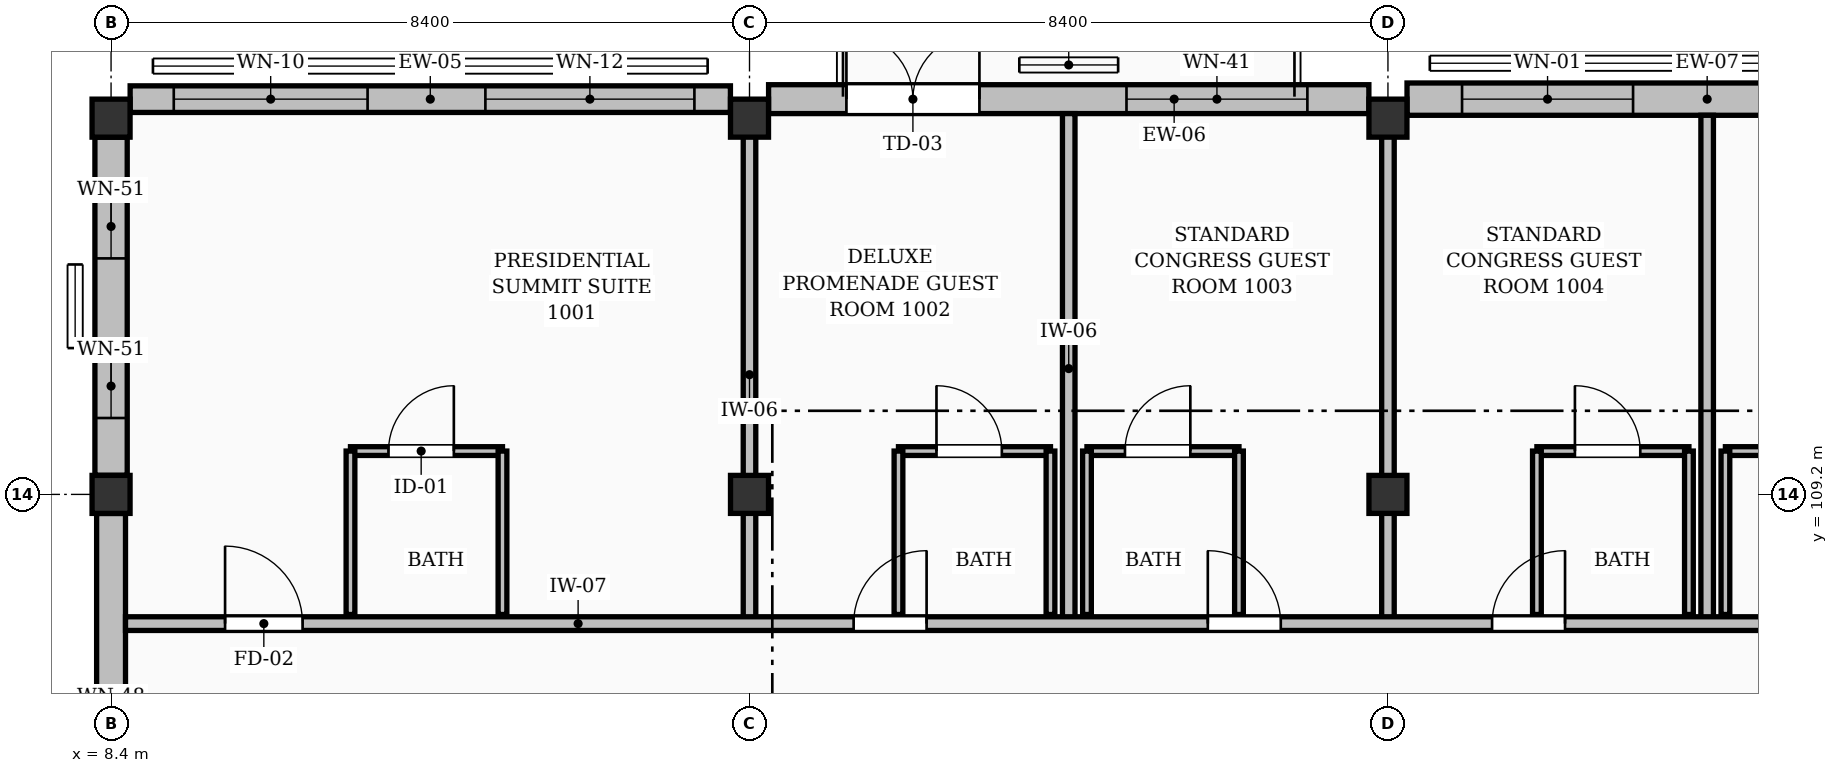
"""IFC4 building model, lengths in metres.
Left out: names, types, materials, properties, quantities, classifications, styles, units other than length and angle.
Written with IfcOpenShell. Run it as: python <this file> out.ifc"""

import sys

from ifc_helpers import new_model, si_unit, direction, frame, frame_2d, origin, origin_2d, place, context, subcontext, project, spatial, rectangle, extrude, element, fill, save


model = new_model("IFC4")
c1 = context("Model", 3, precision=1e-05, world=origin(), true_north=direction((0.0, 1.0)))
c2 = subcontext(c1, "Body", "Model", "MODEL_VIEW")
j1 = project(units=[si_unit("LENGTHUNIT", "METRE"), si_unit("PLANEANGLEUNIT", "RADIAN")], contexts=[c1])
p1 = place(None, origin())
s1 = spatial("IfcSite", under=j1, at=p1, CompositionType="ELEMENT")
p2 = place(p1, origin())
s2 = spatial("IfcBuilding", under=s1, at=p2, CompositionType="ELEMENT")
p3 = place(p2, frame((0.0, 0.0, 35.28)))
s3 = spatial("IfcBuildingStorey", under=s2, at=p3, CompositionType="ELEMENT", Elevation=35.28)
for number, where, z_axis, x_axis in (
    (1, (8.4, 109.2, 0.0), (0.0, 0.0, 1.0), (1.0, 0.0, 0.0)),
    (2, (8.4, 114.15, 0.0), (0.0, 0.0, 1.0), (1.0, 0.0, 0.0)),
    (3, (16.8, 109.2, 0.0), (0.0, 0.0, 1.0), (1.0, 0.0, 0.0)),
    (4, (16.8, 114.15, 0.0), (0.0, 0.0, 1.0), (1.0, 0.0, 0.0)),
    (5, (25.2, 109.2, 0.0), (0.0, 0.0, 1.0), (1.0, 0.0, 0.0)),
    (6, (25.2, 114.15, 0.0), (0.0, 0.0, 1.0), (1.0, 0.0, 0.0)),
):
    element("IfcColumn", number, at=place(p3, frame(where, z_axis=z_axis, x_axis=x_axis)), inside=s3, PredefinedType="COLUMN", context=c2, shape_type="SweptSolid", body=[
        extrude(rectangle(XDim=0.5, YDim=0.5, at=origin_2d()), origin(), (0.0, 0.0, 1.0), 3.36),
    ])
p4 = place(p3, frame((8.651, 114.4, 0.0), z_axis=(0.0, 0.0, 1.0), x_axis=(1.0, 0.0, 0.0)))
e7 = element("IfcWall", 7, at=p4, inside=s3, PredefinedType="SOLIDWALL", context=c2, shape_type="SweptSolid", body=[
    extrude(rectangle(XDim=7.898, YDim=0.35, at=frame_2d((3.949, 0.0))), origin(), (0.0, 0.0, 1.0), 2.514),
])
p5 = place(p4, frame((0.574, 0.0, 0.25)))
e8 = element("IfcOpeningElement", 8, at=p5, cuts=e7, PredefinedType="OPENING", context=c2, shape_type="SweptSolid", body=[
    extrude(rectangle(XDim=2.55, YDim=1.95, at=frame_2d((1.275, 0.975))), frame((0.0, 0.185, 0.0), z_axis=(0.0, -1.0, 0.0), x_axis=(1.0, 0.0, 0.0)), (0.0, 0.0, 1.0), 0.37),
])
p6 = place(p4, frame((4.674, 0.0, 0.25)))
e9 = element("IfcOpeningElement", 9, at=p6, cuts=e7, PredefinedType="OPENING", context=c2, shape_type="SweptSolid", body=[
    extrude(rectangle(XDim=2.75, YDim=1.95, at=frame_2d((1.375, 0.975))), frame((0.0, 0.185, 0.0), z_axis=(0.0, -1.0, 0.0), x_axis=(1.0, 0.0, 0.0)), (0.0, 0.0, 1.0), 0.37),
])
p7 = place(p3, frame((17.051, 114.4, 0.0), z_axis=(0.0, 0.0, 1.0), x_axis=(1.0, 0.0, 0.0)))
e10 = element("IfcWall", 10, at=p7, inside=s3, PredefinedType="SOLIDWALL", context=c2, shape_type="SweptSolid", body=[
    extrude(rectangle(XDim=7.898, YDim=0.38, at=frame_2d((3.949, 0.0))), origin(), (0.0, 0.0, 1.0), 2.514),
])
p8 = place(p7, frame((1.024, 0.0, 0.0)))
e11 = element("IfcOpeningElement", 11, at=p8, cuts=e10, PredefinedType="OPENING", context=c2, shape_type="SweptSolid", body=[
    extrude(rectangle(XDim=1.75, YDim=2.08, at=frame_2d((0.875, 1.04))), frame((0.0, 0.2, 0.0), z_axis=(0.0, -1.0, 0.0), x_axis=(1.0, 0.0, 0.0)), (0.0, 0.0, 1.0), 0.4),
])
p9 = place(p7, frame((4.709, 0.0, 0.25)))
e12 = element("IfcOpeningElement", 12, at=p9, cuts=e10, PredefinedType="OPENING", context=c2, shape_type="SweptSolid", body=[
    extrude(rectangle(XDim=2.38, YDim=2.0, at=frame_2d((1.19, 1.0))), frame((0.0, 0.2, 0.0), z_axis=(0.0, -1.0, 0.0), x_axis=(1.0, 0.0, 0.0)), (0.0, 0.0, 1.0), 0.4),
])
p10 = place(p3, frame((25.451, 114.4, 0.0), z_axis=(0.0, 0.0, 1.0), x_axis=(1.0, 0.0, 0.0)))
e13 = element("IfcWall", 13, at=p10, inside=s3, PredefinedType="SOLIDWALL", context=c2, shape_type="SweptSolid", body=[
    extrude(rectangle(XDim=7.898, YDim=0.425, at=frame_2d((3.949, 0.0))), origin(), (0.0, 0.0, 1.0), 2.514),
])
p11 = place(p10, frame((0.724, 0.0, 0.25)))
e14 = element("IfcOpeningElement", 14, at=p11, cuts=e13, PredefinedType="OPENING", context=c2, shape_type="SweptSolid", body=[
    extrude(rectangle(XDim=2.25, YDim=1.85, at=frame_2d((1.125, 0.925))), frame((0.0, 0.223, 0.0), z_axis=(0.0, -1.0, 0.0), x_axis=(1.0, 0.0, 0.0)), (0.0, 0.0, 1.0), 0.445),
])
p12 = place(p10, frame((4.924, 0.0, 0.25)))
e15 = element("IfcOpeningElement", 15, at=p12, cuts=e13, PredefinedType="OPENING", context=c2, shape_type="SweptSolid", body=[
    extrude(rectangle(XDim=2.25, YDim=1.95, at=frame_2d((1.125, 0.975))), frame((0.0, 0.223, 0.0), z_axis=(0.0, -1.0, 0.0), x_axis=(1.0, 0.0, 0.0)), (0.0, 0.0, 1.0), 0.445),
])
p13 = place(p3, frame((8.4, 101.051, 0.0), z_axis=(0.0, 0.0, 1.0), x_axis=(0.0, 1.0, 0.0)))
e16 = element("IfcWall", 16, at=p13, inside=s3, PredefinedType="SOLIDWALL", context=c2, shape_type="SweptSolid", body=[
    extrude(rectangle(XDim=7.898, YDim=0.38, at=frame_2d((3.949, 0.0))), origin(), (0.0, 0.0, 1.0), 2.514),
])
p14 = place(p13, frame((2.449, 0.0, 0.3)))
e17 = element("IfcOpeningElement", 17, at=p14, cuts=e16, PredefinedType="OPENING", context=c2, shape_type="SweptSolid", body=[
    extrude(rectangle(XDim=0.9, YDim=1.85, at=frame_2d((0.45, 0.925))), frame((0.0, 0.2, 0.0), z_axis=(0.0, -1.0, 0.0), x_axis=(1.0, 0.0, 0.0)), (0.0, 0.0, 1.0), 0.4),
])
p15 = place(p13, frame((4.549, 0.0, 0.3)))
e18 = element("IfcOpeningElement", 18, at=p15, cuts=e16, PredefinedType="OPENING", context=c2, shape_type="SweptSolid", body=[
    extrude(rectangle(XDim=0.9, YDim=1.85, at=frame_2d((0.45, 0.925))), frame((0.0, 0.2, 0.0), z_axis=(0.0, -1.0, 0.0), x_axis=(1.0, 0.0, 0.0)), (0.0, 0.0, 1.0), 0.4),
])
p16 = place(p3, frame((8.4, 109.451, 0.0), z_axis=(0.0, 0.0, 1.0), x_axis=(0.0, 1.0, 0.0)))
e19 = element("IfcWall", 19, at=p16, inside=s3, PredefinedType="SOLIDWALL", context=c2, shape_type="SweptSolid", body=[
    extrude(rectangle(XDim=4.448, YDim=0.425, at=frame_2d((2.224, 0.0))), origin(), (0.0, 0.0, 1.0), 2.514),
])
p17 = place(p16, frame((0.754, 0.0, 0.3)))
e20 = element("IfcOpeningElement", 20, at=p17, cuts=e19, PredefinedType="OPENING", context=c2, shape_type="SweptSolid", body=[
    extrude(rectangle(XDim=0.84, YDim=1.95, at=frame_2d((0.42, 0.975))), frame((0.0, 0.223, 0.0), z_axis=(0.0, -1.0, 0.0), x_axis=(1.0, 0.0, 0.0)), (0.0, 0.0, 1.0), 0.445),
])
p18 = place(p16, frame((2.854, 0.0, 0.3)))
e21 = element("IfcOpeningElement", 21, at=p18, cuts=e19, PredefinedType="OPENING", context=c2, shape_type="SweptSolid", body=[
    extrude(rectangle(XDim=0.84, YDim=1.95, at=frame_2d((0.42, 0.975))), frame((0.0, 0.223, 0.0), z_axis=(0.0, -1.0, 0.0), x_axis=(1.0, 0.0, 0.0)), (0.0, 0.0, 1.0), 0.445),
])
p19 = place(p3, frame((11.55, 109.77, 0.0), z_axis=(0.0, 0.0, 1.0), x_axis=(1.0, 0.0, 0.0)))
e22 = element("IfcWall", 22, at=p19, inside=s3, PredefinedType="PARTITIONING", context=c2, shape_type="SweptSolid", body=[
    extrude(rectangle(XDim=2.0, YDim=0.115, at=frame_2d((1.0, 0.0))), origin(), (0.0, 0.0, 1.0), 3.14),
])
p20 = place(p19, frame((0.5, 0.0, 0.0)))
e23 = element("IfcOpeningElement", 23, at=p20, cuts=e22, PredefinedType="OPENING", context=c2, shape_type="SweptSolid", body=[
    extrude(rectangle(XDim=0.86, YDim=2.05, at=frame_2d((0.43, 1.025))), frame((0.0, 0.067, 0.0), z_axis=(0.0, -1.0, 0.0), x_axis=(1.0, 0.0, 0.0)), (0.0, 0.0, 1.0), 0.135),
])
for number, where, z_axis, x_axis in (
    (24, (11.55, 107.62, 0.0), (0.0, 0.0, 1.0), (0.0, 1.0, 0.0)),
    (25, (13.55, 107.62, 0.0), (0.0, 0.0, 1.0), (0.0, 1.0, 0.0)),
):
    element("IfcWall", number, at=place(p3, frame(where, z_axis=z_axis, x_axis=x_axis)), inside=s3, PredefinedType="PARTITIONING", context=c2, shape_type="SweptSolid", body=[
        extrude(rectangle(XDim=2.15, YDim=0.115, at=frame_2d((1.075, 0.0))), origin(), (0.0, 0.0, 1.0), 3.14),
    ])
p21 = place(p3, frame((18.76, 109.77, 0.0), z_axis=(0.0, 0.0, 1.0), x_axis=(1.0, 0.0, 0.0)))
e26 = element("IfcWall", 26, at=p21, inside=s3, PredefinedType="PARTITIONING", context=c2, shape_type="SweptSolid", body=[
    extrude(rectangle(XDim=2.0, YDim=0.115, at=frame_2d((1.0, 0.0))), origin(), (0.0, 0.0, 1.0), 3.14),
])
p22 = place(p21, frame((0.5, 0.0, 0.0)))
e27 = element("IfcOpeningElement", 27, at=p22, cuts=e26, PredefinedType="OPENING", context=c2, shape_type="SweptSolid", body=[
    extrude(rectangle(XDim=0.86, YDim=2.05, at=frame_2d((0.43, 1.025))), frame((0.0, 0.067, 0.0), z_axis=(0.0, -1.0, 0.0), x_axis=(1.0, 0.0, 0.0)), (0.0, 0.0, 1.0), 0.135),
])
for number, where, z_axis, x_axis in (
    (28, (18.76, 107.62, 0.0), (0.0, 0.0, 1.0), (0.0, 1.0, 0.0)),
    (29, (20.76, 107.62, 0.0), (0.0, 0.0, 1.0), (0.0, 1.0, 0.0)),
):
    element("IfcWall", number, at=place(p3, frame(where, z_axis=z_axis, x_axis=x_axis)), inside=s3, PredefinedType="PARTITIONING", context=c2, shape_type="SweptSolid", body=[
        extrude(rectangle(XDim=2.15, YDim=0.115, at=frame_2d((1.075, 0.0))), origin(), (0.0, 0.0, 1.0), 3.14),
    ])
p23 = place(p3, frame((21.24, 109.77, 0.0), z_axis=(0.0, 0.0, 1.0), x_axis=(1.0, 0.0, 0.0)))
e30 = element("IfcWall", 30, at=p23, inside=s3, PredefinedType="PARTITIONING", context=c2, shape_type="SweptSolid", body=[
    extrude(rectangle(XDim=2.0, YDim=0.115, at=frame_2d((1.0, 0.0))), origin(), (0.0, 0.0, 1.0), 3.14),
])
p24 = place(p23, frame((0.5, 0.0, 0.0)))
e31 = element("IfcOpeningElement", 31, at=p24, cuts=e30, PredefinedType="OPENING", context=c2, shape_type="SweptSolid", body=[
    extrude(rectangle(XDim=0.86, YDim=2.05, at=frame_2d((0.43, 1.025))), frame((0.0, 0.067, 0.0), z_axis=(0.0, -1.0, 0.0), x_axis=(1.0, 0.0, 0.0)), (0.0, 0.0, 1.0), 0.135),
])
for number, where, z_axis, x_axis in (
    (32, (21.24, 107.62, 0.0), (0.0, 0.0, 1.0), (0.0, 1.0, 0.0)),
    (33, (23.24, 107.62, 0.0), (0.0, 0.0, 1.0), (0.0, 1.0, 0.0)),
):
    element("IfcWall", number, at=place(p3, frame(where, z_axis=z_axis, x_axis=x_axis)), inside=s3, PredefinedType="PARTITIONING", context=c2, shape_type="SweptSolid", body=[
        extrude(rectangle(XDim=2.15, YDim=0.115, at=frame_2d((1.075, 0.0))), origin(), (0.0, 0.0, 1.0), 3.14),
    ])
p25 = place(p3, frame((21.0, 107.5, 0.0), z_axis=(0.0, 0.0, 1.0), x_axis=(0.0, 1.0, 0.0)))
e34 = element("IfcWall", 34, at=p25, inside=s3, PredefinedType="PARTITIONING", context=c2, shape_type="SweptSolid", body=[
    extrude(rectangle(XDim=6.71, YDim=0.165, at=frame_2d((3.355, 0.0))), origin(), (0.0, 0.0, 1.0), 3.14),
])
p26 = place(p3, frame((16.8, 107.5, 0.0), z_axis=(0.0, 0.0, 1.0), x_axis=(0.0, 1.0, 0.0)))
e35 = element("IfcWall", 35, at=p26, inside=s3, PredefinedType="PARTITIONING", context=c2, shape_type="SweptSolid", body=[
    extrude(rectangle(XDim=6.55, YDim=0.165, at=frame_2d((3.275, 0.0))), origin(), (0.0, 0.0, 1.0), 2.514),
])
p27 = place(p3, frame((27.16, 109.77, 0.0), z_axis=(0.0, 0.0, 1.0), x_axis=(1.0, 0.0, 0.0)))
e36 = element("IfcWall", 36, at=p27, inside=s3, PredefinedType="PARTITIONING", context=c2, shape_type="SweptSolid", body=[
    extrude(rectangle(XDim=2.0, YDim=0.115, at=frame_2d((1.0, 0.0))), origin(), (0.0, 0.0, 1.0), 3.14),
])
p28 = place(p27, frame((0.5, 0.0, 0.0)))
e37 = element("IfcOpeningElement", 37, at=p28, cuts=e36, PredefinedType="OPENING", context=c2, shape_type="SweptSolid", body=[
    extrude(rectangle(XDim=0.86, YDim=2.05, at=frame_2d((0.43, 1.025))), frame((0.0, 0.067, 0.0), z_axis=(0.0, -1.0, 0.0), x_axis=(1.0, 0.0, 0.0)), (0.0, 0.0, 1.0), 0.135),
])
for number, where, z_axis, x_axis in (
    (38, (27.16, 107.62, 0.0), (0.0, 0.0, 1.0), (0.0, 1.0, 0.0)),
    (39, (29.16, 107.62, 0.0), (0.0, 0.0, 1.0), (0.0, 1.0, 0.0)),
):
    element("IfcWall", number, at=place(p3, frame(where, z_axis=z_axis, x_axis=x_axis)), inside=s3, PredefinedType="PARTITIONING", context=c2, shape_type="SweptSolid", body=[
        extrude(rectangle(XDim=2.15, YDim=0.115, at=frame_2d((1.075, 0.0))), origin(), (0.0, 0.0, 1.0), 3.14),
    ])
p29 = place(p3, frame((29.64, 109.77, 0.0), z_axis=(0.0, 0.0, 1.0), x_axis=(1.0, 0.0, 0.0)))
e40 = element("IfcWall", 40, at=p29, inside=s3, PredefinedType="PARTITIONING", context=c2, shape_type="SweptSolid", body=[
    extrude(rectangle(XDim=2.0, YDim=0.115, at=frame_2d((1.0, 0.0))), origin(), (0.0, 0.0, 1.0), 3.14),
])
p30 = place(p29, frame((0.5, 0.0, 0.0)))
e41 = element("IfcOpeningElement", 41, at=p30, cuts=e40, PredefinedType="OPENING", context=c2, shape_type="SweptSolid", body=[
    extrude(rectangle(XDim=0.86, YDim=2.05, at=frame_2d((0.43, 1.025))), frame((0.0, 0.067, 0.0), z_axis=(0.0, -1.0, 0.0), x_axis=(1.0, 0.0, 0.0)), (0.0, 0.0, 1.0), 0.135),
])
p31 = place(p3, frame((29.64, 107.62, 0.0), z_axis=(0.0, 0.0, 1.0), x_axis=(0.0, 1.0, 0.0)))
e42 = element("IfcWall", 42, at=p31, inside=s3, PredefinedType="PARTITIONING", context=c2, shape_type="SweptSolid", body=[
    extrude(rectangle(XDim=2.15, YDim=0.115, at=frame_2d((1.075, 0.0))), origin(), (0.0, 0.0, 1.0), 3.14),
])
p32 = place(p3, frame((29.4, 107.5, 0.0), z_axis=(0.0, 0.0, 1.0), x_axis=(0.0, 1.0, 0.0)))
e43 = element("IfcWall", 43, at=p32, inside=s3, PredefinedType="PARTITIONING", context=c2, shape_type="SweptSolid", body=[
    extrude(rectangle(XDim=6.688, YDim=0.165, at=frame_2d((3.344, 0.0))), origin(), (0.0, 0.0, 1.0), 3.14),
])
p33 = place(p3, frame((25.2, 107.5, 0.0), z_axis=(0.0, 0.0, 1.0), x_axis=(0.0, 1.0, 0.0)))
e44 = element("IfcWall", 44, at=p33, inside=s3, PredefinedType="PARTITIONING", context=c2, shape_type="SweptSolid", body=[
    extrude(rectangle(XDim=6.55, YDim=0.165, at=frame_2d((3.275, 0.0))), origin(), (0.0, 0.0, 1.0), 2.514),
])
p34 = place(p3, frame((8.59, 107.5, 0.0), z_axis=(0.0, 0.0, 1.0), x_axis=(1.0, 0.0, 0.0)))
e45 = element("IfcWall", 45, at=p34, inside=s3, PredefinedType="PARTITIONING", context=c2, shape_type="SweptSolid", body=[
    extrude(rectangle(XDim=25.78, YDim=0.18, at=frame_2d((12.89, 0.0))), origin(), (0.0, 0.0, 1.0), 3.14),
])
p35 = place(p34, frame((1.31, 0.0, 0.0)))
e46 = element("IfcOpeningElement", 46, at=p35, cuts=e45, PredefinedType="OPENING", context=c2, shape_type="SweptSolid", body=[
    extrude(rectangle(XDim=1.02, YDim=2.15, at=frame_2d((0.51, 1.075))), frame((0.0, 0.1, 0.0), z_axis=(0.0, -1.0, 0.0), x_axis=(1.0, 0.0, 0.0)), (0.0, 0.0, 1.0), 0.2),
])
p36 = place(p34, frame((9.58, 0.0, 0.0)))
e47 = element("IfcOpeningElement", 47, at=p36, cuts=e45, PredefinedType="OPENING", context=c2, shape_type="SweptSolid", body=[
    extrude(rectangle(XDim=0.96, YDim=2.15, at=frame_2d((0.48, 1.075))), frame((0.0, 0.1, 0.0), z_axis=(0.0, -1.0, 0.0), x_axis=(1.0, 0.0, 0.0)), (0.0, 0.0, 1.0), 0.2),
])
p37 = place(p34, frame((14.24, 0.0, 0.0)))
e48 = element("IfcOpeningElement", 48, at=p37, cuts=e45, PredefinedType="OPENING", context=c2, shape_type="SweptSolid", body=[
    extrude(rectangle(XDim=0.96, YDim=2.15, at=frame_2d((0.48, 1.075))), frame((0.0, 0.1, 0.0), z_axis=(0.0, -1.0, 0.0), x_axis=(1.0, 0.0, 0.0)), (0.0, 0.0, 1.0), 0.2),
])
p38 = place(p34, frame((17.98, 0.0, 0.0)))
e49 = element("IfcOpeningElement", 49, at=p38, cuts=e45, PredefinedType="OPENING", context=c2, shape_type="SweptSolid", body=[
    extrude(rectangle(XDim=0.96, YDim=2.15, at=frame_2d((0.48, 1.075))), frame((0.0, 0.1, 0.0), z_axis=(0.0, -1.0, 0.0), x_axis=(1.0, 0.0, 0.0)), (0.0, 0.0, 1.0), 0.2),
])
p39 = place(p34, frame((22.64, 0.0, 0.0)))
e50 = element("IfcOpeningElement", 50, at=p39, cuts=e45, PredefinedType="OPENING", context=c2, shape_type="SweptSolid", body=[
    extrude(rectangle(XDim=0.96, YDim=2.15, at=frame_2d((0.48, 1.075))), frame((0.0, 0.1, 0.0), z_axis=(0.0, -1.0, 0.0), x_axis=(1.0, 0.0, 0.0)), (0.0, 0.0, 1.0), 0.2),
])
p40 = place(p5, origin())
e51 = element("IfcWindow", 51, at=p40, inside=s3, PartitioningType="DOUBLE_PANEL_VERTICAL", PredefinedType="WINDOW", context=c2, shape_type="SweptSolid", body=[
    extrude(rectangle(XDim=2.55, YDim=1.95, at=frame_2d((1.275, 0.975))), frame((0.0, 0.03, 0.0), z_axis=(0.0, -1.0, 0.0), x_axis=(1.0, 0.0, 0.0)), (0.0, 0.0, 1.0), 0.06),
])
fill(e8, e51)
p41 = place(p6, origin())
e52 = element("IfcWindow", 52, at=p41, inside=s3, PartitioningType="DOUBLE_PANEL_VERTICAL", PredefinedType="WINDOW", context=c2, shape_type="SweptSolid", body=[
    extrude(rectangle(XDim=2.75, YDim=1.95, at=frame_2d((1.375, 0.975))), frame((0.0, 0.03, 0.0), z_axis=(0.0, -1.0, 0.0), x_axis=(1.0, 0.0, 0.0)), (0.0, 0.0, 1.0), 0.06),
])
fill(e9, e52)
p42 = place(p8, origin())
e53 = element("IfcDoor", 53, at=p42, inside=s3, OperationType="DOUBLE_DOOR_SINGLE_SWING", PredefinedType="DOOR", context=c2, shape_type="SweptSolid", body=[
    extrude(rectangle(XDim=1.75, YDim=2.08, at=frame_2d((0.875, 1.04))), frame((0.0, 0.025, 0.0), z_axis=(0.0, -1.0, 0.0), x_axis=(1.0, 0.0, 0.0)), (0.0, 0.0, 1.0), 0.05),
])
fill(e11, e53)
p43 = place(p9, origin())
e54 = element("IfcWindow", 54, at=p43, inside=s3, PartitioningType="DOUBLE_PANEL_VERTICAL", PredefinedType="WINDOW", context=c2, shape_type="SweptSolid", body=[
    extrude(rectangle(XDim=2.38, YDim=2.0, at=frame_2d((1.19, 1.0))), frame((0.0, 0.03, 0.0), z_axis=(0.0, -1.0, 0.0), x_axis=(1.0, 0.0, 0.0)), (0.0, 0.0, 1.0), 0.06),
])
fill(e12, e54)
p44 = place(p11, origin())
e55 = element("IfcWindow", 55, at=p44, inside=s3, PartitioningType="DOUBLE_PANEL_VERTICAL", PredefinedType="WINDOW", context=c2, shape_type="SweptSolid", body=[
    extrude(rectangle(XDim=2.25, YDim=1.85, at=frame_2d((1.125, 0.925))), frame((0.0, 0.03, 0.0), z_axis=(0.0, -1.0, 0.0), x_axis=(1.0, 0.0, 0.0)), (0.0, 0.0, 1.0), 0.06),
])
fill(e14, e55)
p45 = place(p17, origin())
e56 = element("IfcWindow", 56, at=p45, inside=s3, PartitioningType="SINGLE_PANEL", PredefinedType="WINDOW", context=c2, shape_type="SweptSolid", body=[
    extrude(rectangle(XDim=0.84, YDim=1.95, at=frame_2d((0.42, 0.975))), frame((0.0, 0.03, 0.0), z_axis=(0.0, -1.0, 0.0), x_axis=(1.0, 0.0, 0.0)), (0.0, 0.0, 1.0), 0.06),
])
fill(e20, e56)
p46 = place(p18, origin())
e57 = element("IfcWindow", 57, at=p46, inside=s3, PartitioningType="SINGLE_PANEL", PredefinedType="WINDOW", context=c2, shape_type="SweptSolid", body=[
    extrude(rectangle(XDim=0.84, YDim=1.95, at=frame_2d((0.42, 0.975))), frame((0.0, 0.03, 0.0), z_axis=(0.0, -1.0, 0.0), x_axis=(1.0, 0.0, 0.0)), (0.0, 0.0, 1.0), 0.06),
])
fill(e21, e57)
p47 = place(p20, origin())
e58 = element("IfcDoor", 58, at=p47, inside=s3, OperationType="SINGLE_SWING_RIGHT", PredefinedType="DOOR", context=c2, shape_type="SweptSolid", body=[
    extrude(rectangle(XDim=0.86, YDim=2.05, at=frame_2d((0.43, 1.025))), frame((0.0, 0.025, 0.0), z_axis=(0.0, -1.0, 0.0), x_axis=(1.0, 0.0, 0.0)), (0.0, 0.0, 1.0), 0.05),
])
fill(e23, e58)
p48 = place(p22, origin())
e59 = element("IfcDoor", 59, at=p48, inside=s3, OperationType="SINGLE_SWING_LEFT", PredefinedType="DOOR", context=c2, shape_type="SweptSolid", body=[
    extrude(rectangle(XDim=0.86, YDim=2.05, at=frame_2d((0.43, 1.025))), frame((0.0, 0.025, 0.0), z_axis=(0.0, -1.0, 0.0), x_axis=(1.0, 0.0, 0.0)), (0.0, 0.0, 1.0), 0.05),
])
fill(e27, e59)
p49 = place(p24, origin())
e60 = element("IfcDoor", 60, at=p49, inside=s3, OperationType="SINGLE_SWING_RIGHT", PredefinedType="DOOR", context=c2, shape_type="SweptSolid", body=[
    extrude(rectangle(XDim=0.86, YDim=2.05, at=frame_2d((0.43, 1.025))), frame((0.0, 0.025, 0.0), z_axis=(0.0, -1.0, 0.0), x_axis=(1.0, 0.0, 0.0)), (0.0, 0.0, 1.0), 0.05),
])
fill(e31, e60)
p50 = place(p28, origin())
e61 = element("IfcDoor", 61, at=p50, inside=s3, OperationType="SINGLE_SWING_LEFT", PredefinedType="DOOR", context=c2, shape_type="SweptSolid", body=[
    extrude(rectangle(XDim=0.86, YDim=2.05, at=frame_2d((0.43, 1.025))), frame((0.0, 0.025, 0.0), z_axis=(0.0, -1.0, 0.0), x_axis=(1.0, 0.0, 0.0)), (0.0, 0.0, 1.0), 0.05),
])
fill(e37, e61)
p51 = place(p35, origin())
e62 = element("IfcDoor", 62, at=p51, inside=s3, OperationType="SINGLE_SWING_LEFT", PredefinedType="DOOR", context=c2, shape_type="SweptSolid", body=[
    extrude(rectangle(XDim=1.02, YDim=2.15, at=frame_2d((0.51, 1.075))), frame((0.0, 0.025, 0.0), z_axis=(0.0, -1.0, 0.0), x_axis=(1.0, 0.0, 0.0)), (0.0, 0.0, 1.0), 0.05),
])
fill(e46, e62)
p52 = place(p36, origin())
e63 = element("IfcDoor", 63, at=p52, inside=s3, OperationType="SINGLE_SWING_RIGHT", PredefinedType="DOOR", context=c2, shape_type="SweptSolid", body=[
    extrude(rectangle(XDim=0.96, YDim=2.15, at=frame_2d((0.48, 1.075))), frame((0.0, 0.025, 0.0), z_axis=(0.0, -1.0, 0.0), x_axis=(1.0, 0.0, 0.0)), (0.0, 0.0, 1.0), 0.05),
])
fill(e47, e63)
p53 = place(p37, origin())
e64 = element("IfcDoor", 64, at=p53, inside=s3, OperationType="SINGLE_SWING_LEFT", PredefinedType="DOOR", context=c2, shape_type="SweptSolid", body=[
    extrude(rectangle(XDim=0.96, YDim=2.15, at=frame_2d((0.48, 1.075))), frame((0.0, 0.025, 0.0), z_axis=(0.0, -1.0, 0.0), x_axis=(1.0, 0.0, 0.0)), (0.0, 0.0, 1.0), 0.05),
])
fill(e48, e64)
p54 = place(p38, origin())
e65 = element("IfcDoor", 65, at=p54, inside=s3, OperationType="SINGLE_SWING_RIGHT", PredefinedType="DOOR", context=c2, shape_type="SweptSolid", body=[
    extrude(rectangle(XDim=0.96, YDim=2.15, at=frame_2d((0.48, 1.075))), frame((0.0, 0.025, 0.0), z_axis=(0.0, -1.0, 0.0), x_axis=(1.0, 0.0, 0.0)), (0.0, 0.0, 1.0), 0.05),
])
fill(e49, e65)
save(model, sys.argv[1])
